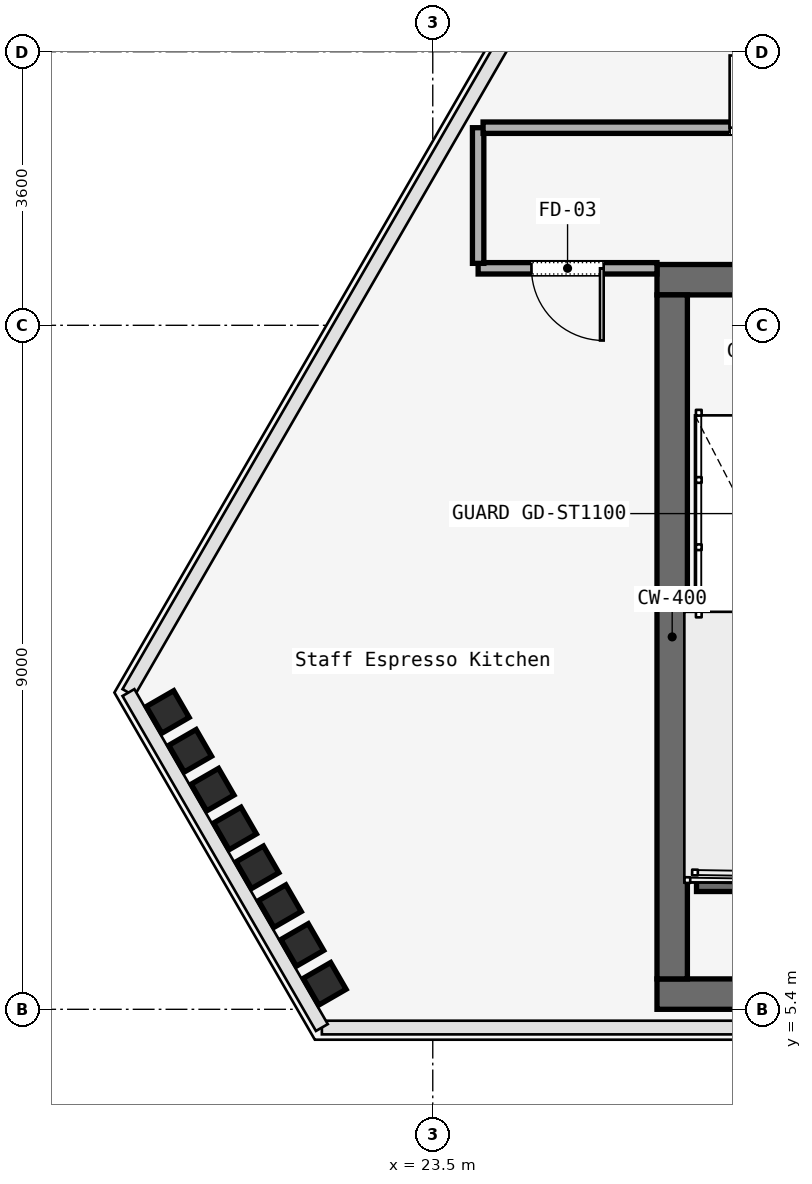
"""IFC4 building model, lengths in metres.
Left out: names, types, materials, properties, quantities, classifications, styles, units other than length and angle.
Written with IfcOpenShell. Run it as: python <this file> out.ifc"""

import sys

from ifc_helpers import new_model, si_unit, direction, frame, frame_2d, origin, origin_2d, place, context, subcontext, project, spatial, rectangle, i_section, extrude, element, fill, save


model = new_model("IFC4")
c1 = context("Model", 3, precision=1e-05, world=origin(), true_north=direction((0.0, 1.0)))
c2 = subcontext(c1, "Body", "Model", "MODEL_VIEW")
j1 = project(units=[si_unit("LENGTHUNIT", "METRE"), si_unit("PLANEANGLEUNIT", "RADIAN")], contexts=[c1])
p1 = place(None, origin())
s1 = spatial("IfcSite", under=j1, at=p1, CompositionType="ELEMENT")
p2 = place(p1, origin())
s2 = spatial("IfcBuilding", under=s1, at=p2, CompositionType="ELEMENT")
p3 = place(p2, frame((0.0, 0.0, 275.0)))
s3 = spatial("IfcBuildingStorey", under=s2, at=p3, CompositionType="ELEMENT", Elevation=275.0)
p4 = place(p3, frame((26.45, 15.0, 0.0), z_axis=(0.0, 0.0, 1.0), x_axis=(1.0, 0.0, 0.0)))
e1 = element("IfcWall", 1, at=p4, inside=s3, PredefinedType="SOLIDWALL", context=c2, shape_type="SweptSolid", body=[
    extrude(rectangle(XDim=31.1, YDim=0.4, at=frame_2d((15.55, 0.0))), origin(), (0.0, 0.0, 1.0), 3.52),
])
p5 = place(p4, frame((1.65, 0.0, 0.0)))
e2 = element("IfcOpeningElement", 2, at=p5, cuts=e1, PredefinedType="OPENING", context=c2, shape_type="SweptSolid", body=[
    extrude(rectangle(XDim=1.1, YDim=2.2, at=frame_2d((0.55, 1.1))), frame((0.0, 0.2, 0.0), z_axis=(0.0, -1.0, 0.0), x_axis=(1.0, 0.0, 0.0)), (0.0, 0.0, 1.0), 0.4),
])
p6 = place(p4, frame((13.65, 0.0, 0.0)))
e3 = element("IfcOpeningElement", 3, at=p6, cuts=e1, PredefinedType="OPENING", context=c2, shape_type="SweptSolid", body=[
    extrude(rectangle(XDim=1.1, YDim=2.2, at=frame_2d((0.55, 1.1))), frame((0.0, 0.2, 0.0), z_axis=(0.0, -1.0, 0.0), x_axis=(1.0, 0.0, 0.0)), (0.0, 0.0, 1.0), 0.4),
])
p7 = place(p4, frame((25.55, 0.0, 0.0)))
e4 = element("IfcOpeningElement", 4, at=p7, cuts=e1, PredefinedType="OPENING", context=c2, shape_type="SweptSolid", body=[
    extrude(rectangle(XDim=1.1, YDim=2.2, at=frame_2d((0.55, 1.1))), frame((0.0, 0.2, 0.0), z_axis=(0.0, -1.0, 0.0), x_axis=(1.0, 0.0, 0.0)), (0.0, 0.0, 1.0), 0.4),
])
p8 = place(p4, frame((19.35, 0.0, 0.0)))
e5 = element("IfcOpeningElement", 5, at=p8, cuts=e1, PredefinedType="OPENING", context=c2, shape_type="SweptSolid", body=[
    extrude(rectangle(XDim=1.1, YDim=2.2, at=frame_2d((0.55, 1.1))), frame((0.0, 0.2, 0.0), z_axis=(0.0, -1.0, 0.0), x_axis=(1.0, 0.0, 0.0)), (0.0, 0.0, 1.0), 0.4),
])
p9 = place(p4, frame((21.4, 0.0, 0.0)))
e6 = element("IfcOpeningElement", 6, at=p9, cuts=e1, PredefinedType="OPENING", context=c2, shape_type="SweptSolid", body=[
    extrude(rectangle(XDim=0.9, YDim=2.1, at=frame_2d((0.45, 1.05))), frame((0.0, 0.2, 0.0), z_axis=(0.0, -1.0, 0.0), x_axis=(1.0, 0.0, 0.0)), (0.0, 0.0, 1.0), 0.4),
])
p10 = place(p4, frame((5.54, 0.0, 0.0)))
e7 = element("IfcOpeningElement", 7, at=p10, cuts=e1, PredefinedType="OPENING", context=c2, shape_type="SweptSolid", body=[
    extrude(rectangle(XDim=0.95, YDim=2.2, at=frame_2d((0.475, 1.1))), frame((0.0, 0.2, 0.0), z_axis=(0.0, -1.0, 0.0), x_axis=(1.0, 0.0, 0.0)), (0.0, 0.0, 1.0), 0.4),
])
p11 = place(p4, frame((9.49, 0.0, 0.0)))
e8 = element("IfcOpeningElement", 8, at=p11, cuts=e1, PredefinedType="OPENING", context=c2, shape_type="SweptSolid", body=[
    extrude(rectangle(XDim=0.95, YDim=2.2, at=frame_2d((0.475, 1.1))), frame((0.0, 0.2, 0.0), z_axis=(0.0, -1.0, 0.0), x_axis=(1.0, 0.0, 0.0)), (0.0, 0.0, 1.0), 0.4),
])
p12 = place(p4, frame((23.35, 0.0, 0.0)))
e9 = element("IfcOpeningElement", 9, at=p12, cuts=e1, PredefinedType="OPENING", context=c2, shape_type="SweptSolid", body=[
    extrude(rectangle(XDim=1.3, YDim=2.3, at=frame_2d((0.65, 1.15))), frame((0.0, 0.2, 0.0), z_axis=(0.0, -1.0, 0.0), x_axis=(1.0, 0.0, 0.0)), (0.0, 0.0, 1.0), 0.4),
])
p13 = place(p3, frame((26.45, 5.6, 0.0), z_axis=(0.0, 0.0, 1.0), x_axis=(1.0, 0.0, 0.0)))
e10 = element("IfcWall", 10, at=p13, inside=s3, PredefinedType="SOLIDWALL", context=c2, shape_type="SweptSolid", body=[
    extrude(rectangle(XDim=31.1, YDim=0.4, at=frame_2d((15.55, 0.0))), origin(), (0.0, 0.0, 1.0), 3.52),
])
p14 = place(p3, frame((26.65, 5.8, 0.0), z_axis=(0.0, 0.0, 1.0), x_axis=(0.0, 1.0, 0.0)))
e11 = element("IfcWall", 11, at=p14, inside=s3, PredefinedType="SOLIDWALL", context=c2, shape_type="SweptSolid", body=[
    extrude(rectangle(XDim=9.0, YDim=0.4, at=frame_2d((4.5, 0.0))), origin(), (0.0, 0.0, 1.0), 3.52),
])
p15 = place(p3, frame((20.013, 9.312, 0.0), z_axis=(0.033570270082, -0.083787525944, 0.99591801242), x_axis=(-0.784908715569, 0.614660738798, 0.078169587455)))
e12 = element("IfcColumn", 12, at=p15, inside=s3, PredefinedType="COLUMN", context=c2, shape_type="SweptSolid", body=[
    extrude(i_section(OverallWidth=0.406, OverallDepth=0.416, WebThickness=0.03, FlangeThickness=0.037, FilletRadius=0.015, at=origin_2d()), origin(), (0.0, 0.0, 1.0), 3.534),
])
p16 = place(p3, frame((20.308, 8.801, 0.0), z_axis=(0.027175422808, -0.072675240131, 0.996985358903), x_axis=(-0.770735243649, 0.633602429445, 0.067194833132)))
e13 = element("IfcColumn", 13, at=p16, inside=s3, PredefinedType="COLUMN", context=c2, shape_type="SweptSolid", body=[
    extrude(i_section(OverallWidth=0.406, OverallDepth=0.416, WebThickness=0.03, FlangeThickness=0.037, FilletRadius=0.015, at=origin_2d()), origin(), (0.0, 0.0, 1.0), 3.531),
])
p17 = place(p3, frame((20.603, 8.29, 0.0), z_axis=(0.020763317909, -0.061597843129, 0.997885058687), x_axis=(-0.749847531911, 0.659211363411, 0.05629438015)))
e14 = element("IfcColumn", 14, at=p17, inside=s3, PredefinedType="COLUMN", context=c2, shape_type="SweptSolid", body=[
    extrude(i_section(OverallWidth=0.406, OverallDepth=0.416, WebThickness=0.03, FlangeThickness=0.037, FilletRadius=0.015, at=origin_2d()), origin(), (0.0, 0.0, 1.0), 3.528),
])
p18 = place(p3, frame((20.898, 7.779, 0.0), z_axis=(0.014268064992, -0.050423064632, 0.998626024533), x_axis=(-0.716583758046, 0.696023110507, 0.045382235997)))
e15 = element("IfcColumn", 15, at=p18, inside=s3, PredefinedType="COLUMN", context=c2, shape_type="SweptSolid", body=[
    extrude(i_section(OverallWidth=0.406, OverallDepth=0.416, WebThickness=0.03, FlangeThickness=0.037, FilletRadius=0.015, at=origin_2d()), origin(), (0.0, 0.0, 1.0), 3.525),
])
p19 = place(p3, frame((21.193, 7.268, 0.0), z_axis=(0.007831153253, -0.039225068506, 0.99919971329), x_axis=(-0.65974093121, 0.750694314596, 0.034640290421)))
e16 = element("IfcColumn", 16, at=p19, inside=s3, PredefinedType="COLUMN", context=c2, shape_type="SweptSolid", body=[
    extrude(i_section(OverallWidth=0.406, OverallDepth=0.416, WebThickness=0.03, FlangeThickness=0.037, FilletRadius=0.015, at=origin_2d()), origin(), (0.0, 0.0, 1.0), 3.523),
])
p20 = place(p3, frame((21.488, 6.757, 0.0), z_axis=(0.00138660937, -0.028009509279, 0.999606695008), x_axis=(-0.542191703835, 0.839903753308, 0.02428665213)))
e17 = element("IfcColumn", 17, at=p20, inside=s3, PredefinedType="COLUMN", context=c2, shape_type="SweptSolid", body=[
    extrude(i_section(OverallWidth=0.406, OverallDepth=0.416, WebThickness=0.03, FlangeThickness=0.037, FilletRadius=0.015, at=origin_2d()), origin(), (0.0, 0.0, 1.0), 3.521),
])
p21 = place(p3, frame((21.783, 6.246, 0.0), z_axis=(-0.005131682914, -0.016781990071, 0.999846003462), x_axis=(-0.224941540665, 0.974253727867, 0.015197928155)))
e18 = element("IfcColumn", 18, at=p21, inside=s3, PredefinedType="COLUMN", context=c2, shape_type="SweptSolid", body=[
    extrude(i_section(OverallWidth=0.406, OverallDepth=0.416, WebThickness=0.03, FlangeThickness=0.037, FilletRadius=0.015, at=origin_2d()), origin(), (0.0, 0.0, 1.0), 3.521),
])
p22 = place(p3, frame((22.078, 5.736, 0.0), z_axis=(-0.011581784156, -0.005617512076, 0.999917149485), x_axis=(0.560938958584, 0.827782105459, 0.011147673507)))
e19 = element("IfcColumn", 19, at=p22, inside=s3, PredefinedType="COLUMN", context=c2, shape_type="SweptSolid", body=[
    extrude(i_section(OverallWidth=0.406, OverallDepth=0.416, WebThickness=0.03, FlangeThickness=0.037, FilletRadius=0.015, at=origin_2d()), origin(), (0.0, 0.0, 1.0), 3.52),
])
p23 = place(p3, frame((26.97, 7.05, 0.0), z_axis=(0.0, 0.0, 1.0), x_axis=(1.0, 0.0, 0.0)))
e20 = element("IfcWall", 20, at=p23, inside=s3, PredefinedType="SOLIDWALL", context=c2, shape_type="SweptSolid", body=[
    extrude(rectangle(XDim=3.115, YDim=0.2, at=frame_2d((1.558, 0.0))), origin(), (0.0, 0.0, 1.0), 3.8),
])
p24 = place(p3, frame((26.45, 15.15, 0.0), z_axis=(0.0, 0.0, 1.0), x_axis=(-1.0, 0.0, 0.0)))
e21 = element("IfcWall", 21, at=p24, inside=s3, PredefinedType="PARTITIONING", context=c2, shape_type="SweptSolid", body=[
    extrude(rectangle(XDim=2.353, YDim=0.15, at=frame_2d((1.177, 0.0))), origin(), (0.0, 0.0, 1.0), 2.95),
])
p25 = place(p24, frame((0.701, 0.0, 0.0)))
e22 = element("IfcOpeningElement", 22, at=p25, cuts=e21, PredefinedType="OPENING", context=c2, shape_type="SweptSolid", body=[
    extrude(rectangle(XDim=0.95, YDim=2.2, at=frame_2d((0.475, 1.1))), frame((0.0, 0.075, 0.0), z_axis=(0.0, -1.0, 0.0), x_axis=(1.0, 0.0, 0.0)), (0.0, 0.0, 1.0), 0.15),
])
p26 = place(p3, frame((24.097, 15.215, 0.0), z_axis=(0.0, 0.0, 1.0), x_axis=(0.0, 1.0, 0.0)))
e23 = element("IfcWall", 23, at=p26, inside=s3, PredefinedType="PARTITIONING", context=c2, shape_type="SweptSolid", body=[
    extrude(rectangle(XDim=1.785, YDim=0.15, at=frame_2d((0.893, 0.0))), origin(), (0.0, 0.0, 1.0), 2.95),
])
p27 = place(p3, frame((24.162, 17.0, 0.0), z_axis=(0.0, 0.0, 1.0), x_axis=(1.0, 0.0, 0.0)))
e24 = element("IfcWall", 24, at=p27, inside=s3, PredefinedType="PARTITIONING", context=c2, shape_type="SweptSolid", body=[
    extrude(rectangle(XDim=7.438, YDim=0.15, at=frame_2d((3.719, 0.0))), origin(), (0.0, 0.0, 1.0), 2.95),
])
p28 = place(p27, frame((3.244, 0.0, 0.0)))
e25 = element("IfcOpeningElement", 25, at=p28, cuts=e24, PredefinedType="OPENING", context=c2, shape_type="SweptSolid", body=[
    extrude(rectangle(XDim=0.95, YDim=2.2, at=frame_2d((0.475, 1.1))), frame((0.0, 0.075, 0.0), z_axis=(0.0, -1.0, 0.0), x_axis=(1.0, 0.0, 0.0)), (0.0, 0.0, 1.0), 0.15),
])
p29 = place(p25, origin())
e26 = element("IfcDoor", 26, at=p29, inside=s3, OperationType="SINGLE_SWING_LEFT", PredefinedType="DOOR", context=c2, shape_type="SweptSolid", body=[
    extrude(rectangle(XDim=0.95, YDim=2.2, at=frame_2d((0.475, 1.1))), frame((0.0, 0.025, 0.0), z_axis=(0.0, -1.0, 0.0), x_axis=(1.0, 0.0, 0.0)), (0.0, 0.0, 1.0), 0.05),
])
fill(e22, e26)
p30 = place(p28, origin())
e27 = element("IfcDoor", 27, at=p30, inside=s3, OperationType="SINGLE_SWING_RIGHT", PredefinedType="DOOR", context=c2, shape_type="SweptSolid", body=[
    extrude(rectangle(XDim=0.95, YDim=2.2, at=frame_2d((0.475, 1.1))), frame((0.0, 0.025, 0.0), z_axis=(0.0, -1.0, 0.0), x_axis=(1.0, 0.0, 0.0)), (0.0, 0.0, 1.0), 0.05),
])
fill(e25, e27)
save(model, sys.argv[1])
